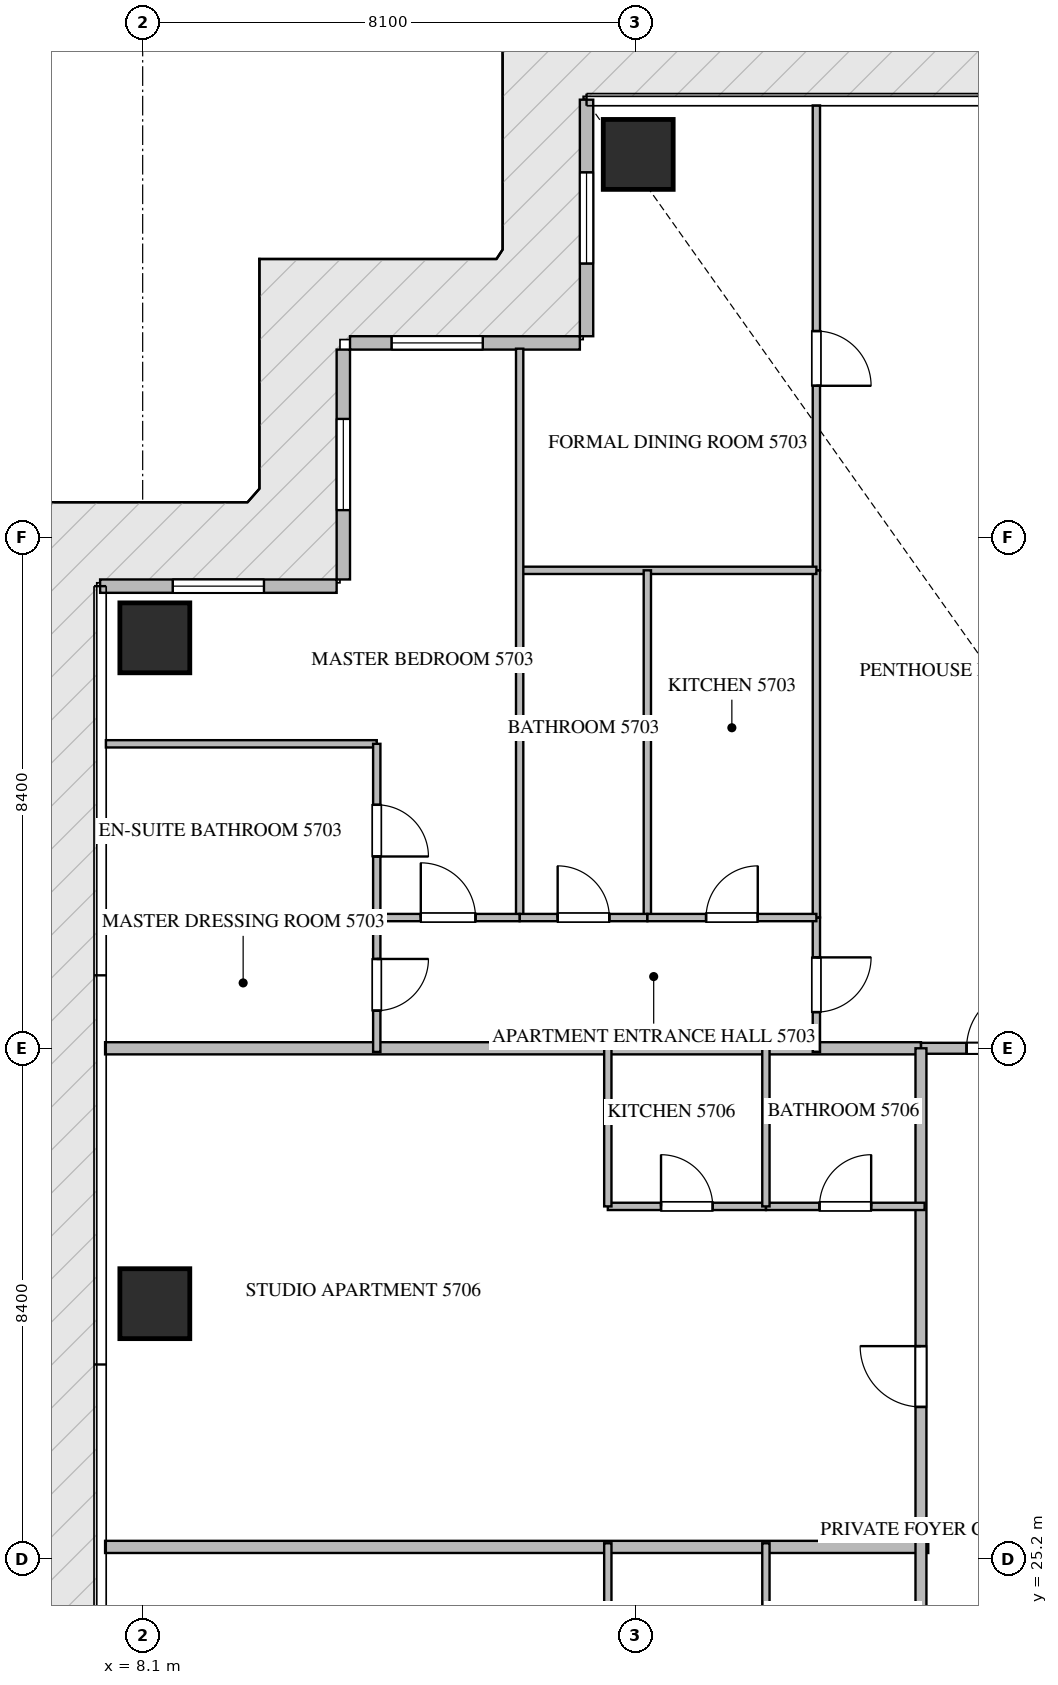
"""IFC4 building model, lengths in metres.
Left out: names, types, materials, properties, quantities, classifications, styles, units other than length and angle.
Written with IfcOpenShell. Run it as: python <this file> out.ifc"""

import sys

from ifc_helpers import new_model, si_unit, direction, frame, frame_2d, origin, origin_2d, place, context, subcontext, project, spatial, rectangle, extrude, source, transform, mapped, element, fill, save


model = new_model("IFC4")
c1 = context("Model", 3, precision=1e-05, world=origin(), true_north=direction((0.0, 1.0)))
c2 = subcontext(c1, "Body", "Model", "MODEL_VIEW")
j1 = project(units=[si_unit("LENGTHUNIT", "METRE"), si_unit("PLANEANGLEUNIT", "RADIAN")], contexts=[c1])
p1 = place(None, origin())
s1 = spatial("IfcSite", under=j1, at=p1, CompositionType="ELEMENT")
p2 = place(p1, origin())
s2 = spatial("IfcBuilding", under=s1, at=p2, CompositionType="ELEMENT")
p3 = place(p2, frame((0.0, 0.0, 229.7)))
s3 = spatial("IfcBuildingStorey", under=s2, at=p3, CompositionType="ELEMENT", Elevation=229.7)
m1 = source(origin(), c2, "Body", "SweptSolid", [
    extrude(rectangle(XDim=1.15, YDim=1.15, at=origin_2d()), origin(), (0.0, 0.0, 1.0), 3.85),
])
for number, where, z_axis, x_axis in (
    (1, (16.25, 48.3, -0.26), (0.0, 0.0, 1.0), (1.0, 0.0, 0.0)),
    (2, (8.3, 29.4, -0.26), (0.0, 0.0, 1.0), (1.0, 0.0, 0.0)),
    (3, (8.3, 40.35, -0.26), (0.0, 0.0, 1.0), (1.0, 0.0, 0.0)),
):
    element("IfcColumn", number, at=place(p3, frame(where, z_axis=z_axis, x_axis=x_axis)), inside=s3, PredefinedType="COLUMN", context=c2, shape_type="MappedRepresentation", body=[
        mapped(m1, transform((0.0, 0.0, 0.0), scale=1.0)),
    ])
p4 = place(p3, frame((15.4, 49.2, 0.0), z_axis=(0.0, 0.0, 1.0), x_axis=(0.0, -1.0, 0.0)))
e4 = element("IfcWall", 4, at=p4, inside=s3, PredefinedType="ELEMENTEDWALL", context=c2, shape_type="SweptSolid", body=[
    extrude(rectangle(XDim=3.89, YDim=0.22, at=frame_2d((1.945, 0.0))), origin(), (0.0, 0.0, 1.0), 3.575),
])
p5 = place(p4, frame((1.195, 0.0, 0.65)))
e5 = element("IfcOpeningElement", 5, at=p5, cuts=e4, PredefinedType="OPENING", context=c2, shape_type="SweptSolid", body=[
    extrude(rectangle(XDim=1.5, YDim=2.25, at=frame_2d((0.75, 1.125))), frame((0.0, 0.12, 0.0), z_axis=(0.0, -1.0, 0.0), x_axis=(1.0, 0.0, 0.0)), (0.0, 0.0, 1.0), 0.24),
])
p6 = place(p3, frame((15.29, 45.2, 0.0), z_axis=(0.0, 0.0, 1.0), x_axis=(-1.0, 0.0, 0.0)))
e6 = element("IfcWall", 6, at=p6, inside=s3, PredefinedType="ELEMENTEDWALL", context=c2, shape_type="SweptSolid", body=[
    extrude(rectangle(XDim=3.78, YDim=0.22, at=frame_2d((1.89, 0.0))), origin(), (0.0, 0.0, 1.0), 3.575),
])
p7 = place(p6, frame((1.596, 0.0, 0.65)))
e7 = element("IfcOpeningElement", 7, at=p7, cuts=e6, PredefinedType="OPENING", context=c2, shape_type="SweptSolid", body=[
    extrude(rectangle(XDim=1.5, YDim=2.25, at=frame_2d((0.75, 1.125))), frame((0.0, 0.12, 0.0), z_axis=(0.0, -1.0, 0.0), x_axis=(1.0, 0.0, 0.0)), (0.0, 0.0, 1.0), 0.24),
])
p8 = place(p3, frame((11.4, 45.09, 0.0), z_axis=(0.0, 0.0, 1.0), x_axis=(0.0, -1.0, 0.0)))
e8 = element("IfcWall", 8, at=p8, inside=s3, PredefinedType="ELEMENTEDWALL", context=c2, shape_type="SweptSolid", body=[
    extrude(rectangle(XDim=3.78, YDim=0.22, at=frame_2d((1.89, 0.0))), origin(), (0.0, 0.0, 1.0), 3.575),
])
p9 = place(p8, frame((1.14, 0.0, 0.65)))
e9 = element("IfcOpeningElement", 9, at=p9, cuts=e8, PredefinedType="OPENING", context=c2, shape_type="SweptSolid", body=[
    extrude(rectangle(XDim=1.5, YDim=2.25, at=frame_2d((0.75, 1.125))), frame((0.0, 0.12, 0.0), z_axis=(0.0, -1.0, 0.0), x_axis=(1.0, 0.0, 0.0)), (0.0, 0.0, 1.0), 0.24),
])
p10 = place(p3, frame((11.29, 41.2, 0.0), z_axis=(0.0, 0.0, 1.0), x_axis=(-1.0, 0.0, 0.0)))
e10 = element("IfcWall", 10, at=p10, inside=s3, PredefinedType="ELEMENTEDWALL", context=c2, shape_type="SweptSolid", body=[
    extrude(rectangle(XDim=3.89, YDim=0.22, at=frame_2d((1.945, 0.0))), origin(), (0.0, 0.0, 1.0), 3.575),
])
p11 = place(p10, frame((1.195, 0.0, 0.65)))
e11 = element("IfcOpeningElement", 11, at=p11, cuts=e10, PredefinedType="OPENING", context=c2, shape_type="SweptSolid", body=[
    extrude(rectangle(XDim=1.5, YDim=2.25, at=frame_2d((0.75, 1.125))), frame((0.0, 0.12, 0.0), z_axis=(0.0, -1.0, 0.0), x_axis=(1.0, 0.0, 0.0)), (0.0, 0.0, 1.0), 0.24),
])
p12 = place(p3, frame((7.482, 25.4, 0.0), z_axis=(0.0, 0.0, 1.0), x_axis=(1.0, 0.0, 0.0)))
e12 = element("IfcWall", 12, at=p12, inside=s3, PredefinedType="PARTITIONING", context=c2, shape_type="SweptSolid", body=[
    extrude(rectangle(XDim=13.538, YDim=0.2, at=frame_2d((6.769, 0.0))), origin(), (0.0, 0.0, 1.0), 3.59),
])
p13 = place(p3, frame((7.482, 33.6, 0.0), z_axis=(0.0, 0.0, 1.0), x_axis=(1.0, 0.0, 0.0)))
e13 = element("IfcWall", 13, at=p13, inside=s3, PredefinedType="PARTITIONING", context=c2, shape_type="SweptSolid", body=[
    extrude(rectangle(XDim=13.418, YDim=0.2, at=frame_2d((6.709, 0.0))), origin(), (0.0, 0.0, 1.0), 3.59),
])
p14 = place(p3, frame((20.902, 33.6, 0.0), z_axis=(0.0, 0.0, 1.0), x_axis=(1.0, 0.0, 0.0)))
e14 = element("IfcWall", 14, at=p14, inside=s3, PredefinedType="PARTITIONING", context=c2, shape_type="SweptSolid", body=[
    extrude(rectangle(XDim=2.496, YDim=0.18, at=frame_2d((1.248, 0.0))), origin(), (0.0, 0.0, 1.0), 3.59),
])
p15 = place(p14, frame((0.748, 0.0, 0.0)))
e15 = element("IfcOpeningElement", 15, at=p15, cuts=e14, PredefinedType="OPENING", context=c2, shape_type="SweptSolid", body=[
    extrude(rectangle(XDim=1.0, YDim=2.15, at=frame_2d((0.5, 1.075))), frame((0.0, 0.1, 0.0), z_axis=(0.0, -1.0, 0.0), x_axis=(1.0, 0.0, 0.0)), (0.0, 0.0, 1.0), 0.2),
])
p16 = place(p3, frame((20.9, 16.8, 0.0), z_axis=(0.0, 0.0, 1.0), x_axis=(0.0, 1.0, 0.0)))
e16 = element("IfcWall", 16, at=p16, inside=s3, PredefinedType="PARTITIONING", context=c2, shape_type="SweptSolid", body=[
    extrude(rectangle(XDim=16.8, YDim=0.18, at=frame_2d((8.4, 0.0))), origin(), (0.0, 0.0, 1.0), 3.59),
])
p17 = place(p16, frame((2.465, 0.0, 0.0)))
e17 = element("IfcOpeningElement", 17, at=p17, cuts=e16, PredefinedType="OPENING", context=c2, shape_type="SweptSolid", body=[
    extrude(rectangle(XDim=1.0, YDim=2.15, at=frame_2d((0.5, 1.075))), frame((0.0, 0.1, 0.0), z_axis=(0.0, -1.0, 0.0), x_axis=(1.0, 0.0, 0.0)), (0.0, 0.0, 1.0), 0.2),
])
p18 = place(p16, frame((10.902, 0.0, 0.0)))
e18 = element("IfcOpeningElement", 18, at=p18, cuts=e16, PredefinedType="OPENING", context=c2, shape_type="SweptSolid", body=[
    extrude(rectangle(XDim=1.0, YDim=2.15, at=frame_2d((0.5, 1.075))), frame((0.0, 0.1, 0.0), z_axis=(0.0, -1.0, 0.0), x_axis=(1.0, 0.0, 0.0)), (0.0, 0.0, 1.0), 0.2),
])
p19 = place(p3, frame((19.18, 35.75, 0.0), z_axis=(0.0, 0.0, 1.0), x_axis=(0.0, -1.0, 0.0)))
e19 = element("IfcWall", 19, at=p19, inside=s3, PredefinedType="PARTITIONING", context=c2, shape_type="SweptSolid", body=[
    extrude(rectangle(XDim=2.21, YDim=0.12, at=frame_2d((1.105, 0.0))), origin(), (0.0, 0.0, 1.0), 3.59),
])
p20 = place(p19, frame((0.655, 0.0, 0.0)))
e20 = element("IfcOpeningElement", 20, at=p20, cuts=e19, PredefinedType="OPENING", context=c2, shape_type="SweptSolid", body=[
    extrude(rectangle(XDim=0.9, YDim=2.1, at=frame_2d((0.45, 1.05))), frame((0.0, 0.07, 0.0), z_axis=(0.0, -1.0, 0.0), x_axis=(1.0, 0.0, 0.0)), (0.0, 0.0, 1.0), 0.14),
])
p21 = place(p3, frame((19.18, 49.105, 0.0), z_axis=(0.0, 0.0, 1.0), x_axis=(0.0, -1.0, 0.0)))
e21 = element("IfcWall", 21, at=p21, inside=s3, PredefinedType="PARTITIONING", context=c2, shape_type="SweptSolid", body=[
    extrude(rectangle(XDim=7.645, YDim=0.12, at=frame_2d((3.823, 0.0))), origin(), (0.0, 0.0, 1.0), 3.59),
])
p22 = place(p21, frame((3.71, 0.0, 0.0)))
e22 = element("IfcOpeningElement", 22, at=p22, cuts=e21, PredefinedType="OPENING", context=c2, shape_type="SweptSolid", body=[
    extrude(rectangle(XDim=0.9, YDim=2.1, at=frame_2d((0.45, 1.05))), frame((0.0, 0.07, 0.0), z_axis=(0.0, -1.0, 0.0), x_axis=(1.0, 0.0, 0.0)), (0.0, 0.0, 1.0), 0.14),
])
p23 = place(p3, frame((19.18, 41.458, 0.0), z_axis=(0.0, 0.0, 1.0), x_axis=(0.0, -1.0, 0.0)))
e23 = element("IfcWall", 23, at=p23, inside=s3, PredefinedType="PARTITIONING", context=c2, shape_type="SweptSolid", body=[
    extrude(rectangle(XDim=5.706, YDim=0.12, at=frame_2d((2.853, 0.0))), origin(), (0.0, 0.0, 1.0), 3.59),
])
p24 = place(p3, frame((14.3, 41.46, 0.0), z_axis=(0.0, 0.0, 1.0), x_axis=(1.0, 0.0, 0.0)))
e24 = element("IfcWall", 24, at=p24, inside=s3, PredefinedType="PARTITIONING", context=c2, shape_type="SweptSolid", body=[
    extrude(rectangle(XDim=4.88, YDim=0.12, at=frame_2d((2.44, 0.0))), origin(), (0.0, 0.0, 1.0), 3.59),
])
p25 = place(p3, frame((14.3, 45.105, 0.0), z_axis=(0.0, 0.0, 1.0), x_axis=(0.0, -1.0, 0.0)))
e25 = element("IfcWall", 25, at=p25, inside=s3, PredefinedType="PARTITIONING", context=c2, shape_type="SweptSolid", body=[
    extrude(rectangle(XDim=9.355, YDim=0.12, at=frame_2d((4.677, 0.0))), origin(), (0.0, 0.0, 1.0), 3.59),
])
p26 = place(p3, frame((16.4, 41.46, 0.0), z_axis=(0.0, 0.0, 1.0), x_axis=(0.0, -1.0, 0.0)))
e26 = element("IfcWall", 26, at=p26, inside=s3, PredefinedType="PARTITIONING", context=c2, shape_type="SweptSolid", body=[
    extrude(rectangle(XDim=5.71, YDim=0.12, at=frame_2d((2.855, 0.0))), origin(), (0.0, 0.0, 1.0), 3.122),
])
p27 = place(p3, frame((14.3, 35.75, 0.0), z_axis=(0.0, 0.0, 1.0), x_axis=(1.0, 0.0, 0.0)))
e27 = element("IfcWall", 27, at=p27, inside=s3, PredefinedType="PARTITIONING", context=c2, shape_type="SweptSolid", body=[
    extrude(rectangle(XDim=2.1, YDim=0.12, at=frame_2d((1.05, 0.0))), origin(), (0.0, 0.0, 1.0), 3.59),
])
p28 = place(p27, frame((0.625, 0.0, 0.0)))
e28 = element("IfcOpeningElement", 28, at=p28, cuts=e27, PredefinedType="OPENING", context=c2, shape_type="SweptSolid", body=[
    extrude(rectangle(XDim=0.85, YDim=2.1, at=frame_2d((0.425, 1.05))), frame((0.0, 0.07, 0.0), z_axis=(0.0, -1.0, 0.0), x_axis=(1.0, 0.0, 0.0)), (0.0, 0.0, 1.0), 0.14),
])
p29 = place(p3, frame((16.402, 35.75, 0.0), z_axis=(0.0, 0.0, 1.0), x_axis=(1.0, 0.0, 0.0)))
e29 = element("IfcWall", 29, at=p29, inside=s3, PredefinedType="PARTITIONING", context=c2, shape_type="SweptSolid", body=[
    extrude(rectangle(XDim=2.778, YDim=0.12, at=frame_2d((1.389, 0.0))), origin(), (0.0, 0.0, 1.0), 3.59),
])
p30 = place(p29, frame((0.964, 0.0, 0.0)))
e30 = element("IfcOpeningElement", 30, at=p30, cuts=e29, PredefinedType="OPENING", context=c2, shape_type="SweptSolid", body=[
    extrude(rectangle(XDim=0.85, YDim=2.1, at=frame_2d((0.425, 1.05))), frame((0.0, 0.07, 0.0), z_axis=(0.0, -1.0, 0.0), x_axis=(1.0, 0.0, 0.0)), (0.0, 0.0, 1.0), 0.14),
])
p31 = place(p3, frame((11.95, 35.75, 0.0), z_axis=(0.0, 0.0, 1.0), x_axis=(1.0, 0.0, 0.0)))
e31 = element("IfcWall", 31, at=p31, inside=s3, PredefinedType="PARTITIONING", context=c2, shape_type="SweptSolid", body=[
    extrude(rectangle(XDim=2.348, YDim=0.12, at=frame_2d((1.174, 0.0))), origin(), (0.0, 0.0, 1.0), 3.59),
])
p32 = place(p31, frame((0.724, 0.0, 0.0)))
e32 = element("IfcOpeningElement", 32, at=p32, cuts=e31, PredefinedType="OPENING", context=c2, shape_type="SweptSolid", body=[
    extrude(rectangle(XDim=0.9, YDim=2.1, at=frame_2d((0.45, 1.05))), frame((0.0, 0.07, 0.0), z_axis=(0.0, -1.0, 0.0), x_axis=(1.0, 0.0, 0.0)), (0.0, 0.0, 1.0), 0.14),
])
p33 = place(p3, frame((7.495, 38.607, 0.0), z_axis=(0.0, 0.0, 1.0), x_axis=(1.0, 0.0, 0.0)))
e33 = element("IfcWall", 33, at=p33, inside=s3, PredefinedType="PARTITIONING", context=c2, shape_type="SweptSolid", body=[
    extrude(rectangle(XDim=4.455, YDim=0.12, at=frame_2d((2.228, 0.0))), origin(), (0.0, 0.0, 1.0), 3.59),
])
p34 = place(p3, frame((7.495, 35.75, 0.0), z_axis=(0.0, 0.0, 1.0), x_axis=(1.0, 0.0, 0.0)))
e34 = element("IfcWall", 34, at=p34, inside=s3, PredefinedType="PARTITIONING", context=c2, shape_type="SweptSolid", body=[
    extrude(rectangle(XDim=4.453, YDim=0.12, at=frame_2d((2.227, 0.0))), origin(), (0.0, 0.0, 1.0), 3.59),
])
p35 = place(p3, frame((11.95, 38.607, 0.0), z_axis=(0.0, 0.0, 1.0), x_axis=(0.0, -1.0, 0.0)))
e35 = element("IfcWall", 35, at=p35, inside=s3, PredefinedType="PARTITIONING", context=c2, shape_type="SweptSolid", body=[
    extrude(rectangle(XDim=2.857, YDim=0.12, at=frame_2d((1.428, 0.0))), origin(), (0.0, 0.0, 1.0), 3.59),
])
p36 = place(p35, frame((1.003, 0.0, 0.0)))
e36 = element("IfcOpeningElement", 36, at=p36, cuts=e35, PredefinedType="OPENING", context=c2, shape_type="SweptSolid", body=[
    extrude(rectangle(XDim=0.85, YDim=2.1, at=frame_2d((0.425, 1.05))), frame((0.0, 0.07, 0.0), z_axis=(0.0, -1.0, 0.0), x_axis=(1.0, 0.0, 0.0)), (0.0, 0.0, 1.0), 0.14),
])
p37 = place(p3, frame((11.95, 35.748, 0.0), z_axis=(0.0, 0.0, 1.0), x_axis=(0.0, -1.0, 0.0)))
e37 = element("IfcWall", 37, at=p37, inside=s3, PredefinedType="PARTITIONING", context=c2, shape_type="SweptSolid", body=[
    extrude(rectangle(XDim=2.208, YDim=0.12, at=frame_2d((1.104, 0.0))), origin(), (0.0, 0.0, 1.0), 3.59),
])
p38 = place(p37, frame((0.679, 0.0, 0.0)))
e38 = element("IfcOpeningElement", 38, at=p38, cuts=e37, PredefinedType="OPENING", context=c2, shape_type="SweptSolid", body=[
    extrude(rectangle(XDim=0.85, YDim=2.1, at=frame_2d((0.425, 1.05))), frame((0.0, 0.07, 0.0), z_axis=(0.0, -1.0, 0.0), x_axis=(1.0, 0.0, 0.0)), (0.0, 0.0, 1.0), 0.14),
])
for number, where, z_axis, x_axis in (
    (39, (18.35, 22.65, 0.0), (0.0, 0.0, 1.0), (0.0, 1.0, 0.0)),
    (40, (15.75, 22.65, 0.0), (0.0, 0.0, 1.0), (0.0, 1.0, 0.0)),
):
    element("IfcWall", number, at=place(p3, frame(where, z_axis=z_axis, x_axis=x_axis)), inside=s3, PredefinedType="PARTITIONING", context=c2, shape_type="SweptSolid", body=[
        extrude(rectangle(XDim=2.81, YDim=0.12, at=frame_2d((1.405, 0.0))), origin(), (0.0, 0.0, 1.0), 3.59),
    ])
p39 = place(p3, frame((15.75, 31.0, 0.0), z_axis=(0.0, 0.0, 1.0), x_axis=(1.0, 0.0, 0.0)))
e41 = element("IfcWall", 41, at=p39, inside=s3, PredefinedType="PARTITIONING", context=c2, shape_type="SweptSolid", body=[
    extrude(rectangle(XDim=2.6, YDim=0.12, at=frame_2d((1.3, 0.0))), origin(), (0.0, 0.0, 1.0), 3.59),
])
p40 = place(p39, frame((0.875, 0.0, 0.0)))
e42 = element("IfcOpeningElement", 42, at=p40, cuts=e41, PredefinedType="OPENING", context=c2, shape_type="SweptSolid", body=[
    extrude(rectangle(XDim=0.85, YDim=2.1, at=frame_2d((0.425, 1.05))), frame((0.0, 0.07, 0.0), z_axis=(0.0, -1.0, 0.0), x_axis=(1.0, 0.0, 0.0)), (0.0, 0.0, 1.0), 0.14),
])
p41 = place(p3, frame((18.352, 31.0, 0.0), z_axis=(0.0, 0.0, 1.0), x_axis=(1.0, 0.0, 0.0)))
e43 = element("IfcWall", 43, at=p41, inside=s3, PredefinedType="PARTITIONING", context=c2, shape_type="SweptSolid", body=[
    extrude(rectangle(XDim=2.608, YDim=0.12, at=frame_2d((1.304, 0.0))), origin(), (0.0, 0.0, 1.0), 3.59),
])
p42 = place(p41, frame((0.879, 0.0, 0.0)))
e44 = element("IfcOpeningElement", 44, at=p42, cuts=e43, PredefinedType="OPENING", context=c2, shape_type="SweptSolid", body=[
    extrude(rectangle(XDim=0.85, YDim=2.1, at=frame_2d((0.425, 1.05))), frame((0.0, 0.07, 0.0), z_axis=(0.0, -1.0, 0.0), x_axis=(1.0, 0.0, 0.0)), (0.0, 0.0, 1.0), 0.14),
])
for number, where, z_axis, x_axis in (
    (45, (18.35, 31.0, 0.0), (0.0, 0.0, 1.0), (0.0, 1.0, 0.0)),
    (46, (15.75, 31.0, 0.0), (0.0, 0.0, 1.0), (0.0, 1.0, 0.0)),
):
    element("IfcWall", number, at=place(p3, frame(where, z_axis=z_axis, x_axis=x_axis)), inside=s3, PredefinedType="PARTITIONING", context=c2, shape_type="SweptSolid", body=[
        extrude(rectangle(XDim=2.66, YDim=0.12, at=frame_2d((1.33, 0.0))), origin(), (0.0, 0.0, 1.0), 3.59),
    ])
m2 = source(origin(), c2, "Body", "SweptSolid", [
    extrude(rectangle(XDim=1.5, YDim=2.25, at=frame_2d((0.75, 1.125))), frame((0.0, 0.03, 0.0), z_axis=(0.0, -1.0, 0.0), x_axis=(1.0, 0.0, 0.0)), (0.0, 0.0, 1.0), 0.06),
])
p43 = place(p5, origin())
e47 = element("IfcWindow", 47, at=p43, inside=s3, PartitioningType="SINGLE_PANEL", PredefinedType="WINDOW", context=c2, shape_type="MappedRepresentation", body=[
    mapped(m2, transform((0.0, 0.0, 0.0), scale=1.0)),
])
fill(e5, e47)
p44 = place(p7, origin())
e48 = element("IfcWindow", 48, at=p44, inside=s3, PartitioningType="SINGLE_PANEL", PredefinedType="WINDOW", context=c2, shape_type="MappedRepresentation", body=[
    mapped(m2, transform((0.0, 0.0, 0.0), scale=1.0)),
])
fill(e7, e48)
p45 = place(p9, origin())
e49 = element("IfcWindow", 49, at=p45, inside=s3, PartitioningType="SINGLE_PANEL", PredefinedType="WINDOW", context=c2, shape_type="MappedRepresentation", body=[
    mapped(m2, transform((0.0, 0.0, 0.0), scale=1.0)),
])
fill(e9, e49)
p46 = place(p11, origin())
e50 = element("IfcWindow", 50, at=p46, inside=s3, PartitioningType="SINGLE_PANEL", PredefinedType="WINDOW", context=c2, shape_type="MappedRepresentation", body=[
    mapped(m2, transform((0.0, 0.0, 0.0), scale=1.0)),
])
fill(e11, e50)
m3 = source(origin(), c2, "Body", "SweptSolid", [
    extrude(rectangle(XDim=1.0, YDim=2.15, at=frame_2d((0.5, 1.075))), frame((0.0, 0.025, 0.0), z_axis=(0.0, -1.0, 0.0), x_axis=(1.0, 0.0, 0.0)), (0.0, 0.0, 1.0), 0.05),
])
p47 = place(p15, origin())
e51 = element("IfcDoor", 51, at=p47, inside=s3, OperationType="SINGLE_SWING_RIGHT", PredefinedType="DOOR", context=c2, shape_type="MappedRepresentation", body=[
    mapped(m3, transform((0.0, 0.0, 0.0), scale=1.0)),
])
fill(e15, e51)
p48 = place(p18, origin())
e52 = element("IfcDoor", 52, at=p48, inside=s3, OperationType="SINGLE_SWING_RIGHT", PredefinedType="DOOR", context=c2, shape_type="MappedRepresentation", body=[
    mapped(m3, transform((0.0, 0.0, 0.0), scale=1.0)),
])
fill(e18, e52)
m4 = source(origin(), c2, "Body", "SweptSolid", [
    extrude(rectangle(XDim=0.9, YDim=2.1, at=frame_2d((0.45, 1.05))), frame((0.0, 0.025, 0.0), z_axis=(0.0, -1.0, 0.0), x_axis=(1.0, 0.0, 0.0)), (0.0, 0.0, 1.0), 0.05),
])
p49 = place(p20, origin())
e53 = element("IfcDoor", 53, at=p49, inside=s3, OperationType="SINGLE_SWING_LEFT", PredefinedType="DOOR", context=c2, shape_type="MappedRepresentation", body=[
    mapped(m4, transform((0.0, 0.0, 0.0), scale=1.0)),
])
fill(e20, e53)
p50 = place(p22, origin())
e54 = element("IfcDoor", 54, at=p50, inside=s3, OperationType="SINGLE_SWING_RIGHT", PredefinedType="DOOR", context=c2, shape_type="MappedRepresentation", body=[
    mapped(m4, transform((0.0, 0.0, 0.0), scale=1.0)),
])
fill(e22, e54)
m5 = source(origin(), c2, "Body", "SweptSolid", [
    extrude(rectangle(XDim=0.85, YDim=2.1, at=frame_2d((0.425, 1.05))), frame((0.0, 0.025, 0.0), z_axis=(0.0, -1.0, 0.0), x_axis=(1.0, 0.0, 0.0)), (0.0, 0.0, 1.0), 0.05),
])
p51 = place(p28, origin())
e55 = element("IfcDoor", 55, at=p51, inside=s3, OperationType="SINGLE_SWING_LEFT", PredefinedType="DOOR", context=c2, shape_type="MappedRepresentation", body=[
    mapped(m5, transform((0.0, 0.0, 0.0), scale=1.0)),
])
fill(e28, e55)
p52 = place(p30, origin())
e56 = element("IfcDoor", 56, at=p52, inside=s3, OperationType="SINGLE_SWING_RIGHT", PredefinedType="DOOR", context=c2, shape_type="MappedRepresentation", body=[
    mapped(m5, transform((0.0, 0.0, 0.0), scale=1.0)),
])
fill(e30, e56)
p53 = place(p32, origin())
e57 = element("IfcDoor", 57, at=p53, inside=s3, OperationType="SINGLE_SWING_LEFT", PredefinedType="DOOR", context=c2, shape_type="MappedRepresentation", body=[
    mapped(m4, transform((0.0, 0.0, 0.0), scale=1.0)),
])
fill(e32, e57)
p54 = place(p36, origin())
e58 = element("IfcDoor", 58, at=p54, inside=s3, OperationType="SINGLE_SWING_RIGHT", PredefinedType="DOOR", context=c2, shape_type="MappedRepresentation", body=[
    mapped(m5, transform((0.0, 0.0, 0.0), scale=1.0)),
])
fill(e36, e58)
p55 = place(p38, origin())
e59 = element("IfcDoor", 59, at=p55, inside=s3, OperationType="SINGLE_SWING_LEFT", PredefinedType="DOOR", context=c2, shape_type="MappedRepresentation", body=[
    mapped(m5, transform((0.0, 0.0, 0.0), scale=1.0)),
])
fill(e38, e59)
p56 = place(p40, origin())
e60 = element("IfcDoor", 60, at=p56, inside=s3, OperationType="SINGLE_SWING_LEFT", PredefinedType="DOOR", context=c2, shape_type="MappedRepresentation", body=[
    mapped(m5, transform((0.0, 0.0, 0.0), scale=1.0)),
])
fill(e42, e60)
p57 = place(p42, origin())
e61 = element("IfcDoor", 61, at=p57, inside=s3, OperationType="SINGLE_SWING_RIGHT", PredefinedType="DOOR", context=c2, shape_type="MappedRepresentation", body=[
    mapped(m5, transform((0.0, 0.0, 0.0), scale=1.0)),
])
fill(e44, e61)
save(model, sys.argv[1])
